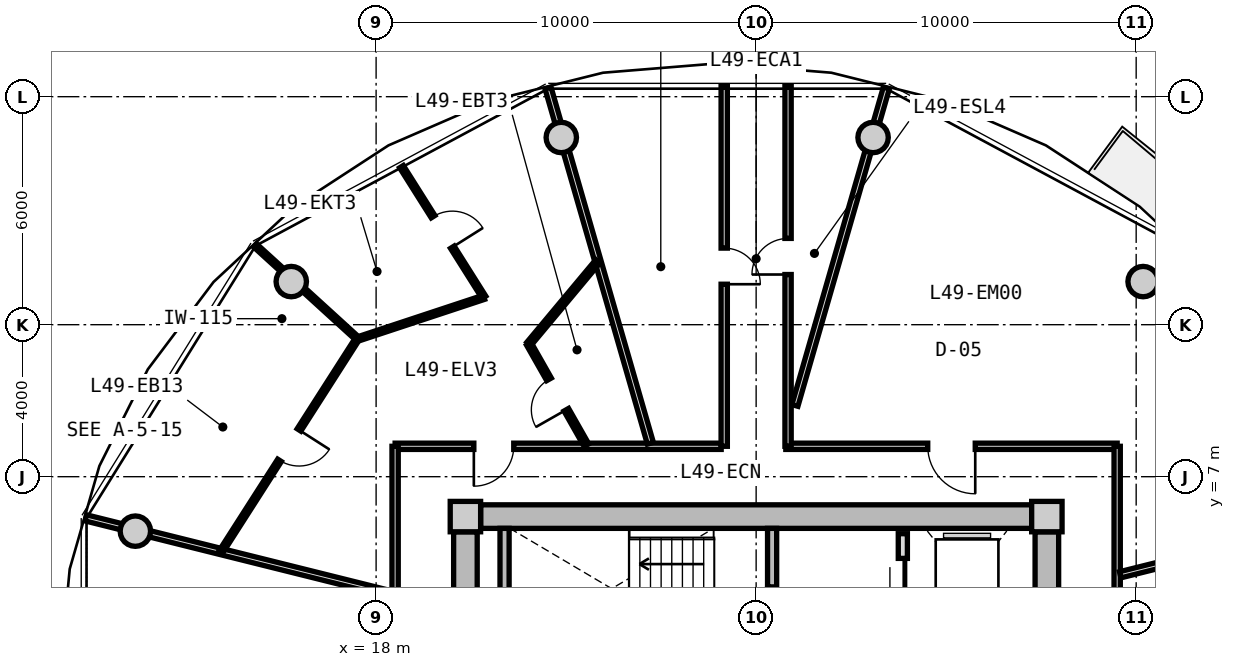
"""IFC4 building model, lengths in metres.
Left out: names, types, materials, properties, quantities, classifications, styles, units other than length and angle.
Written with IfcOpenShell. Run it as: python <this file> out.ifc"""

import sys

from ifc_helpers import new_model, si_unit, direction, frame, frame_2d, origin, origin_2d, place, context, subcontext, project, spatial, rectangle, circle, extrude, source, transform, mapped, element, fill, save


model = new_model("IFC4")
c1 = context("Model", 3, precision=1e-05, world=origin(), true_north=direction((0.0, 1.0)))
c2 = subcontext(c1, "Body", "Model", "MODEL_VIEW")
j1 = project(units=[si_unit("LENGTHUNIT", "METRE"), si_unit("PLANEANGLEUNIT", "RADIAN")], contexts=[c1])
p1 = place(None, origin())
s1 = spatial("IfcSite", under=j1, at=p1, CompositionType="ELEMENT")
p2 = place(p1, origin())
s2 = spatial("IfcBuilding", under=s1, at=p2, CompositionType="ELEMENT")
p3 = place(p2, frame((0.0, 0.0, 158.7)))
s3 = spatial("IfcBuildingStorey", under=s2, at=p3, CompositionType="ELEMENT", Elevation=158.7)
m1 = source(origin(), c2, "Body", "SweptSolid", [
    extrude(rectangle(XDim=0.8, YDim=0.8, at=origin_2d()), origin(), (0.0, 0.0, 1.0), 3.05),
])
for number, where, z_axis, x_axis in (
    (1, (35.65, 5.95, 0.0), (0.0, 0.0, 1.0), (1.0, 0.0, 0.0)),
    (2, (20.35, 5.95, 0.0), (0.0, 0.0, 1.0), (1.0, 0.0, 0.0)),
):
    element("IfcColumn", number, at=place(p3, frame(where, z_axis=z_axis, x_axis=x_axis)), inside=s3, PredefinedType="COLUMN", context=c2, shape_type="MappedRepresentation", body=[
        mapped(m1, transform((0.0, 0.0, 0.0), x_axis=(1.0, 0.0, 0.0), y_axis=(0.0, 1.0, 0.0), z_axis=(0.0, 0.0, 1.0), scale=1.0)),
    ])
m2 = source(origin(), c2, "Body", "SweptSolid", [
    extrude(rectangle(XDim=14.5, YDim=0.62, at=frame_2d((7.25, 0.0))), origin(), (0.0, 0.0, 1.0), 2.81),
])
p4 = place(p3, frame((20.75, 5.95, 0.0), z_axis=(0.0, 0.0, 1.0), x_axis=(1.0, 0.0, 0.0)))
e3 = element("IfcWall", 3, at=p4, inside=s3, PredefinedType="SHEAR", context=c2, shape_type="MappedRepresentation", body=[
    mapped(m2, transform((0.0, 0.0, 0.0), x_axis=(1.0, 0.0, 0.0), y_axis=(0.0, 1.0, 0.0), z_axis=(0.0, 0.0, 1.0), scale=1.0)),
])
m3 = source(origin(), c2, "Body", "SweptSolid", [
    extrude(rectangle(XDim=11.1, YDim=0.62, at=frame_2d((5.55, 0.0))), origin(), (0.0, 0.0, 1.0), 2.81),
])
p5 = place(p3, frame((20.35, -5.55, 0.0), z_axis=(0.0, 0.0, 1.0), x_axis=(0.0, 1.0, 0.0)))
e4 = element("IfcWall", 4, at=p5, inside=s3, PredefinedType="SHEAR", context=c2, shape_type="MappedRepresentation", body=[
    mapped(m3, transform((0.0, 0.0, 0.0), x_axis=(1.0, 0.0, 0.0), y_axis=(0.0, 1.0, 0.0), z_axis=(0.0, 0.0, 1.0), scale=1.0)),
])
p6 = place(p5, frame((3.8, 0.0, 0.0)))
e5 = element("IfcOpeningElement", 5, at=p6, cuts=e4, PredefinedType="OPENING", context=c2, shape_type="SweptSolid", body=[
    extrude(rectangle(XDim=1.2, YDim=2.15, at=frame_2d((0.6, 1.075))), frame((0.0, 0.32, 0.0), z_axis=(0.0, -1.0, 0.0), x_axis=(1.0, 0.0, 0.0)), (0.0, 0.0, 1.0), 0.64),
])
p7 = place(p3, frame((35.65, 5.55, 0.0), z_axis=(0.0, 0.0, 1.0), x_axis=(0.0, -1.0, 0.0)))
e6 = element("IfcWall", 6, at=p7, inside=s3, PredefinedType="SHEAR", context=c2, shape_type="MappedRepresentation", body=[
    mapped(m3, transform((0.0, 0.0, 0.0), x_axis=(1.0, 0.0, 0.0), y_axis=(0.0, 1.0, 0.0), z_axis=(0.0, 0.0, 1.0), scale=1.0)),
])
p8 = place(p7, frame((5.65, 0.0, 0.0)))
e7 = element("IfcOpeningElement", 7, at=p8, cuts=e6, PredefinedType="OPENING", context=c2, shape_type="SweptSolid", body=[
    extrude(rectangle(XDim=1.2, YDim=2.15, at=frame_2d((0.6, 1.075))), frame((0.0, 0.32, 0.0), z_axis=(0.0, -1.0, 0.0), x_axis=(1.0, 0.0, 0.0)), (0.0, 0.0, 1.0), 0.64),
])
m4 = source(origin(), c2, "Body", "SweptSolid", [
    extrude(circle(Radius=0.4, at=origin_2d()), origin(), (0.0, 0.0, 1.0), 3.05),
])
for number, where, z_axis, x_axis in (
    (8, (38.183, 12.135, 0.0), (0.0, 0.0, 1.0), (1.0, 0.0, 0.0)),
    (9, (31.077, 15.926, 0.0), (0.0, 0.0, 1.0), (1.0, 0.0, 0.0)),
    (10, (22.873, 15.926, 0.0), (0.0, 0.0, 1.0), (1.0, 0.0, 0.0)),
    (11, (15.767, 12.135, 0.0), (0.0, 0.0, 1.0), (1.0, 0.0, 0.0)),
    (12, (11.665, 5.567, 0.0), (0.0, 0.0, 1.0), (1.0, 0.0, 0.0)),
):
    element("IfcColumn", number, at=place(p3, frame(where, z_axis=z_axis, x_axis=x_axis)), inside=s3, PredefinedType="COLUMN", context=c2, shape_type="MappedRepresentation", body=[
        mapped(m4, transform((0.0, 0.0, 0.0), x_axis=(1.0, 0.0, 0.0), y_axis=(0.0, 1.0, 0.0), z_axis=(0.0, 0.0, 1.0), scale=1.0)),
    ])
m5 = source(origin(), c2, "Body", "SweptSolid", [
    extrude(rectangle(XDim=3.19, YDim=0.24, at=frame_2d((1.595, 0.0))), origin(), (0.0, 0.0, 1.0), 2.81),
])
p9 = place(p3, frame((21.38, 2.45, 0.0), z_axis=(0.0, 0.0, 1.0), x_axis=(0.0, 1.0, 0.0)))
e13 = element("IfcWall", 13, at=p9, inside=s3, PredefinedType="PARTITIONING", context=c2, shape_type="MappedRepresentation", body=[
    mapped(m5, transform((0.0, 0.0, 0.0), x_axis=(1.0, 0.0, 0.0), y_axis=(0.0, 1.0, 0.0), z_axis=(0.0, 0.0, 1.0), scale=1.0)),
])
p10 = place(p3, frame((28.42, 2.45, 0.0), z_axis=(0.0, 0.0, 1.0), x_axis=(0.0, 1.0, 0.0)))
e14 = element("IfcWall", 14, at=p10, inside=s3, PredefinedType="PARTITIONING", context=c2, shape_type="MappedRepresentation", body=[
    mapped(m5, transform((0.0, 0.0, 0.0), x_axis=(1.0, 0.0, 0.0), y_axis=(0.0, 1.0, 0.0), z_axis=(0.0, 0.0, 1.0), scale=1.0)),
])
p11 = place(p10, frame((0.55, 0.0, 0.0)))
e15 = element("IfcOpeningElement", 15, at=p11, cuts=e14, PredefinedType="OPENING", context=c2, shape_type="SweptSolid", body=[
    extrude(rectangle(XDim=1.1, YDim=2.15, at=frame_2d((0.55, 1.075))), frame((0.0, 0.13, 0.0), z_axis=(0.0, -1.0, 0.0), x_axis=(1.0, 0.0, 0.0)), (0.0, 0.0, 1.0), 0.26),
])
m6 = source(origin(), c2, "Body", "SweptSolid", [
    extrude(rectangle(XDim=5.0, YDim=0.24, at=frame_2d((2.5, 0.0))), origin(), (0.0, 0.0, 1.0), 2.795),
])
p12 = place(p3, frame((31.86, 0.5, 0.0), z_axis=(0.0, 0.0, 1.0), x_axis=(0.0, 1.0, 0.0)))
e16 = element("IfcWall", 16, at=p12, inside=s3, PredefinedType="PARTITIONING", context=c2, shape_type="MappedRepresentation", body=[
    mapped(m6, transform((0.0, 0.0, 0.0), x_axis=(1.0, 0.0, 0.0), y_axis=(0.0, 1.0, 0.0), z_axis=(0.0, 0.0, 1.0), scale=1.0)),
])
p13 = place(p12, frame((3.05, 0.0, 0.0)))
e17 = element("IfcOpeningElement", 17, at=p13, cuts=e16, PredefinedType="OPENING", context=c2, shape_type="SweptSolid", body=[
    extrude(rectangle(XDim=1.3, YDim=2.2, at=frame_2d((0.65, 1.1))), frame((0.0, 0.13, 0.0), z_axis=(0.0, -1.0, 0.0), x_axis=(1.0, 0.0, 0.0)), (0.0, 0.0, 1.0), 0.26),
])
p14 = place(p12, frame((0.55, 0.0, 0.0)))
e18 = element("IfcOpeningElement", 18, at=p14, cuts=e16, PredefinedType="OPENING", context=c2, shape_type="SweptSolid", body=[
    extrude(rectangle(XDim=1.3, YDim=2.2, at=frame_2d((0.65, 1.1))), frame((0.0, 0.13, 0.0), z_axis=(0.0, -1.0, 0.0), x_axis=(1.0, 0.0, 0.0)), (0.0, 0.0, 1.0), 0.26),
])
m7 = source(origin(), c2, "Body", "SweptSolid", [
    extrude(rectangle(XDim=8.58, YDim=0.165, at=frame_2d((4.29, 0.0))), origin(), (0.0, 0.0, 1.0), 2.795),
])
p15 = place(p3, frame((18.5, 7.8, 0.0), z_axis=(0.0, 0.0, 1.0), x_axis=(1.0, 0.0, 0.0)))
e19 = element("IfcWall", 19, at=p15, inside=s3, PredefinedType="PARTITIONING", context=c2, shape_type="MappedRepresentation", body=[
    mapped(m7, transform((0.0, 0.0, 0.0), x_axis=(1.0, 0.0, 0.0), y_axis=(0.0, 1.0, 0.0), z_axis=(0.0, 0.0, 1.0), scale=1.0)),
])
p16 = place(p15, frame((2.072, 0.0, 0.0)))
e20 = element("IfcOpeningElement", 20, at=p16, cuts=e19, PredefinedType="OPENING", context=c2, shape_type="SweptSolid", body=[
    extrude(rectangle(XDim=1.05, YDim=2.15, at=frame_2d((0.525, 1.075))), frame((0.0, 0.093, 0.0), z_axis=(0.0, -1.0, 0.0), x_axis=(1.0, 0.0, 0.0)), (0.0, 0.0, 1.0), 0.185),
])
m8 = source(origin(), c2, "Body", "SweptSolid", [
    extrude(rectangle(XDim=8.719, YDim=0.165, at=frame_2d((4.36, 0.0))), origin(), (0.0, 0.0, 1.0), 2.795),
])
p17 = place(p3, frame((28.781, 7.8, 0.0), z_axis=(0.0, 0.0, 1.0), x_axis=(1.0, 0.0, 0.0)))
e21 = element("IfcWall", 21, at=p17, inside=s3, PredefinedType="PARTITIONING", context=c2, shape_type="MappedRepresentation", body=[
    mapped(m8, transform((0.0, 0.0, 0.0), x_axis=(1.0, 0.0, 0.0), y_axis=(0.0, 1.0, 0.0), z_axis=(0.0, 0.0, 1.0), scale=1.0)),
])
p18 = place(p17, frame((3.735, 0.0, 0.0)))
e22 = element("IfcOpeningElement", 22, at=p18, cuts=e21, PredefinedType="OPENING", context=c2, shape_type="SweptSolid", body=[
    extrude(rectangle(XDim=1.25, YDim=2.2, at=frame_2d((0.625, 1.1))), frame((0.0, 0.093, 0.0), z_axis=(0.0, -1.0, 0.0), x_axis=(1.0, 0.0, 0.0)), (0.0, 0.0, 1.0), 0.185),
])
m9 = source(origin(), c2, "Body", "SweptSolid", [
    extrude(rectangle(XDim=6.88, YDim=0.165, at=frame_2d((3.44, 0.0))), origin(), (0.0, 0.0, 1.0), 2.795),
])
for number, where, z_axis, x_axis in (
    (23, (18.5, 0.92, 0.0), (0.0, 0.0, 1.0), (0.0, 1.0, 0.0)),
    (24, (37.5, 7.8, 0.0), (0.0, 0.0, 1.0), (0.0, -1.0, 0.0)),
):
    element("IfcWall", number, at=place(p3, frame(where, z_axis=z_axis, x_axis=x_axis)), inside=s3, PredefinedType="PARTITIONING", context=c2, shape_type="MappedRepresentation", body=[
        mapped(m9, transform((0.0, 0.0, 0.0), x_axis=(1.0, 0.0, 0.0), y_axis=(0.0, 1.0, 0.0), z_axis=(0.0, 0.0, 1.0), scale=1.0)),
    ])
m10 = source(origin(), c2, "Body", "SweptSolid", [
    extrude(rectangle(XDim=8.695, YDim=0.165, at=frame_2d((4.348, 0.0))), origin(), (0.0, 0.0, 1.0), 2.345),
])
p19 = place(p3, frame((29.02, 8.875, 0.0), z_axis=(0.0, 0.0, 1.0), x_axis=(0.276797231892, 0.960928349263, 0.0)))
e25 = element("IfcWall", 25, at=p19, inside=s3, PredefinedType="PARTITIONING", context=c2, shape_type="MappedRepresentation", body=[
    mapped(m10, transform((0.0, 0.0, 0.0), x_axis=(1.0, 0.0, 0.0), y_axis=(0.0, 1.0, 0.0), z_axis=(0.0, 0.0, 1.0), scale=1.0)),
])
m11 = source(origin(), c2, "Body", "SweptSolid", [
    extrude(rectangle(XDim=9.73, YDim=0.165, at=frame_2d((4.865, 0.0))), origin(), (0.0, 0.0, 1.0), 2.345),
])
p20 = place(p3, frame((25.217, 7.88, 0.0), z_axis=(0.0, 0.0, 1.0), x_axis=(-0.27679492614, 0.960929013436, 0.0)))
e26 = element("IfcWall", 26, at=p20, inside=s3, PredefinedType="PARTITIONING", context=c2, shape_type="MappedRepresentation", body=[
    mapped(m11, transform((0.0, 0.0, 0.0), x_axis=(1.0, 0.0, 0.0), y_axis=(0.0, 1.0, 0.0), z_axis=(0.0, 0.0, 1.0), scale=1.0)),
])
m12 = source(origin(), c2, "Body", "SweptSolid", [
    extrude(rectangle(XDim=8.305, YDim=0.165, at=frame_2d((4.153, 0.0))), origin(), (0.0, 0.0, 1.0), 2.345),
])
p21 = place(p3, frame((18.42, 3.908, 0.0), z_axis=(0.0, 0.0, 1.0), x_axis=(-0.970309994378, 0.241864662175, 0.0)))
e27 = element("IfcWall", 27, at=p21, inside=s3, PredefinedType="PARTITIONING", context=c2, shape_type="MappedRepresentation", body=[
    mapped(m12, transform((0.0, 0.0, 0.0), x_axis=(1.0, 0.0, 0.0), y_axis=(0.0, 1.0, 0.0), z_axis=(0.0, 0.0, 1.0), scale=1.0)),
])
m13 = source(origin(), c2, "Body", "SweptSolid", [
    extrude(rectangle(XDim=6.193, YDim=0.165, at=frame_2d((3.096, 0.0))), origin(), (0.0, 0.0, 1.0), 2.345),
])
p22 = place(p3, frame((37.58, 4.419, 0.0), z_axis=(0.0, 0.0, 1.0), x_axis=(0.970309243466, 0.241867674657, 0.0)))
e28 = element("IfcWall", 28, at=p22, inside=s3, PredefinedType="PARTITIONING", context=c2, shape_type="MappedRepresentation", body=[
    mapped(m13, transform((0.0, 0.0, 0.0), x_axis=(1.0, 0.0, 0.0), y_axis=(0.0, 1.0, 0.0), z_axis=(0.0, 0.0, 1.0), scale=1.0)),
])
m14 = source(origin(), c2, "Body", "SweptSolid", [
    extrude(rectangle(XDim=9.48, YDim=0.165, at=frame_2d((4.74, 0.0))), origin(), (0.0, 0.0, 1.0), 2.795),
])
p23 = place(p3, frame((27.16, 7.8, 0.0), z_axis=(0.0, 0.0, 1.0), x_axis=(0.0, 1.0, 0.0)))
e29 = element("IfcWall", 29, at=p23, inside=s3, PredefinedType="PARTITIONING", context=c2, shape_type="MappedRepresentation", body=[
    mapped(m14, transform((0.0, 0.0, 0.0), x_axis=(1.0, 0.0, 0.0), y_axis=(0.0, 1.0, 0.0), z_axis=(0.0, 0.0, 1.0), scale=1.0)),
])
p24 = place(p23, frame((4.265, 0.0, 0.0)))
e30 = element("IfcOpeningElement", 30, at=p24, cuts=e29, PredefinedType="OPENING", context=c2, shape_type="SweptSolid", body=[
    extrude(rectangle(XDim=0.95, YDim=2.1, at=frame_2d((0.475, 1.05))), frame((0.0, 0.093, 0.0), z_axis=(0.0, -1.0, 0.0), x_axis=(1.0, 0.0, 0.0)), (0.0, 0.0, 1.0), 0.185),
])
p25 = place(p3, frame((28.84, 17.28, 0.0), z_axis=(0.0, 0.0, 1.0), x_axis=(0.0, -1.0, 0.0)))
e31 = element("IfcWall", 31, at=p25, inside=s3, PredefinedType="PARTITIONING", context=c2, shape_type="MappedRepresentation", body=[
    mapped(m14, transform((0.0, 0.0, 0.0), x_axis=(1.0, 0.0, 0.0), y_axis=(0.0, 1.0, 0.0), z_axis=(0.0, 0.0, 1.0), scale=1.0)),
])
p26 = place(p25, frame((4.01, 0.0, 0.0)))
e32 = element("IfcOpeningElement", 32, at=p26, cuts=e31, PredefinedType="OPENING", context=c2, shape_type="SweptSolid", body=[
    extrude(rectangle(XDim=0.95, YDim=2.1, at=frame_2d((0.475, 1.05))), frame((0.0, 0.093, 0.0), z_axis=(0.0, -1.0, 0.0), x_axis=(1.0, 0.0, 0.0)), (0.0, 0.0, 1.0), 0.185),
])
m15 = source(origin(), c2, "Body", "SweptSolid", [
    extrude(rectangle(XDim=6.654, YDim=0.115, at=frame_2d((3.327, 0.0))), origin(), (0.0, 0.0, 1.0), 2.795),
])
p27 = place(p3, frame((17.509, 10.632, 0.0), z_axis=(0.0, 0.0, 1.0), x_axis=(-0.53923796816, -0.842153438332, 0.0)))
e33 = element("IfcWall", 33, at=p27, inside=s3, PredefinedType="PARTITIONING", context=c2, shape_type="MappedRepresentation", body=[
    mapped(m15, transform((0.0, 0.0, 0.0), x_axis=(1.0, 0.0, 0.0), y_axis=(0.0, 1.0, 0.0), z_axis=(0.0, 0.0, 1.0), scale=1.0)),
])
p28 = place(p27, frame((2.852, 0.0, 0.0)))
e34 = element("IfcOpeningElement", 34, at=p28, cuts=e33, PredefinedType="OPENING", context=c2, shape_type="SweptSolid", body=[
    extrude(rectangle(XDim=0.95, YDim=2.1, at=frame_2d((0.475, 1.05))), frame((0.0, 0.067, 0.0), z_axis=(0.0, -1.0, 0.0), x_axis=(1.0, 0.0, 0.0)), (0.0, 0.0, 1.0), 0.135),
])
m16 = source(origin(), c2, "Body", "SweptSolid", [
    extrude(rectangle(XDim=3.648, YDim=0.115, at=frame_2d((1.824, 0.0))), origin(), (0.0, 0.0, 1.0), 2.345),
])
p29 = place(p3, frame((17.509, 10.632, 0.0), z_axis=(0.0, 0.0, 1.0), x_axis=(-0.739109697605, 0.67358507622, 0.0)))
e35 = element("IfcWall", 35, at=p29, inside=s3, PredefinedType="PARTITIONING", context=c2, shape_type="MappedRepresentation", body=[
    mapped(m16, transform((0.0, 0.0, 0.0), x_axis=(1.0, 0.0, 0.0), y_axis=(0.0, 1.0, 0.0), z_axis=(0.0, 0.0, 1.0), scale=1.0)),
])
m17 = source(origin(), c2, "Body", "SweptSolid", [
    extrude(rectangle(XDim=3.064, YDim=0.14, at=frame_2d((1.532, 0.0))), origin(), (0.0, 0.0, 1.0), 2.795),
])
p30 = place(p3, frame((23.534, 7.83, 0.0), z_axis=(0.0, 0.0, 1.0), x_axis=(-0.494103864861, 0.869402881712, 0.0)))
e36 = element("IfcWall", 36, at=p30, inside=s3, PredefinedType="PARTITIONING", context=c2, shape_type="MappedRepresentation", body=[
    mapped(m17, transform((0.0, 0.0, 0.0), x_axis=(1.0, 0.0, 0.0), y_axis=(0.0, 1.0, 0.0), z_axis=(0.0, 0.0, 1.0), scale=1.0)),
])
p31 = place(p30, frame((1.072, 0.0, 0.0)))
e37 = element("IfcOpeningElement", 37, at=p31, cuts=e36, PredefinedType="OPENING", context=c2, shape_type="SweptSolid", body=[
    extrude(rectangle(XDim=0.92, YDim=2.1, at=frame_2d((0.46, 1.05))), frame((0.0, 0.08, 0.0), z_axis=(0.0, -1.0, 0.0), x_axis=(1.0, 0.0, 0.0)), (0.0, 0.0, 1.0), 0.16),
])
m18 = source(origin(), c2, "Body", "SweptSolid", [
    extrude(rectangle(XDim=2.833, YDim=0.14, at=frame_2d((1.417, 0.0))), origin(), (0.0, 0.0, 1.0), 2.795),
])
p32 = place(p3, frame((22.02, 10.494, 0.0), z_axis=(0.0, 0.0, 1.0), x_axis=(0.64098072766, 0.767556972979, 0.0)))
e38 = element("IfcWall", 38, at=p32, inside=s3, PredefinedType="PARTITIONING", context=c2, shape_type="MappedRepresentation", body=[
    mapped(m18, transform((0.0, 0.0, 0.0), x_axis=(1.0, 0.0, 0.0), y_axis=(0.0, 1.0, 0.0), z_axis=(0.0, 0.0, 1.0), scale=1.0)),
])
m19 = source(origin(), c2, "Body", "SweptSolid", [
    extrude(rectangle(XDim=4.066, YDim=0.115, at=frame_2d((2.033, 0.0))), origin(), (0.0, 0.0, 1.0), 2.795),
])
p33 = place(p3, frame((20.838, 11.721, 0.0), z_axis=(0.0, 0.0, 1.0), x_axis=(-0.533669868169, 0.8456928945, 0.0)))
e39 = element("IfcWall", 39, at=p33, inside=s3, PredefinedType="PARTITIONING", context=c2, shape_type="MappedRepresentation", body=[
    mapped(m19, transform((0.0, 0.0, 0.0), x_axis=(1.0, 0.0, 0.0), y_axis=(0.0, 1.0, 0.0), z_axis=(0.0, 0.0, 1.0), scale=1.0)),
])
p34 = place(p33, frame((1.558, 0.0, 0.0)))
e40 = element("IfcOpeningElement", 40, at=p34, cuts=e39, PredefinedType="OPENING", context=c2, shape_type="SweptSolid", body=[
    extrude(rectangle(XDim=0.95, YDim=2.1, at=frame_2d((0.475, 1.05))), frame((0.0, 0.067, 0.0), z_axis=(0.0, -1.0, 0.0), x_axis=(1.0, 0.0, 0.0)), (0.0, 0.0, 1.0), 0.135),
])
m20 = source(origin(), c2, "Body", "SweptSolid", [
    extrude(rectangle(XDim=3.496, YDim=0.115, at=frame_2d((1.748, 0.0))), origin(), (0.0, 0.0, 1.0), 2.795),
])
p35 = place(p3, frame((20.838, 11.721, 0.0), z_axis=(0.0, 0.0, 1.0), x_axis=(-0.949420852529, -0.314006440672, 0.0)))
e41 = element("IfcWall", 41, at=p35, inside=s3, PredefinedType="PARTITIONING", context=c2, shape_type="MappedRepresentation", body=[
    mapped(m20, transform((0.0, 0.0, 0.0), x_axis=(1.0, 0.0, 0.0), y_axis=(0.0, 1.0, 0.0), z_axis=(0.0, 0.0, 1.0), scale=1.0)),
])
m21 = source(origin(), c2, "Body", "SweptSolid", [
    extrude(rectangle(XDim=1.3, YDim=2.2, at=frame_2d((0.65, 1.1))), frame((0.0, 0.025, 0.0), z_axis=(0.0, -1.0, 0.0), x_axis=(1.0, 0.0, 0.0)), (0.0, 0.0, 1.0), 0.05),
])
p36 = place(p13, origin())
e42 = element("IfcDoor", 42, at=p36, inside=s3, OperationType="SLIDING_TO_LEFT", PredefinedType="DOOR", context=c2, shape_type="MappedRepresentation", body=[
    mapped(m21, transform((0.0, 0.0, 0.0), x_axis=(1.0, 0.0, 0.0), y_axis=(0.0, 1.0, 0.0), z_axis=(0.0, 0.0, 1.0), scale=1.0)),
])
fill(e17, e42)
m22 = source(origin(), c2, "Body", "SweptSolid", [
    extrude(rectangle(XDim=0.95, YDim=2.1, at=frame_2d((0.475, 1.05))), frame((0.0, 0.025, 0.0), z_axis=(0.0, -1.0, 0.0), x_axis=(1.0, 0.0, 0.0)), (0.0, 0.0, 1.0), 0.05),
])
p37 = place(p24, frame((0.95, 0.0, 0.0), z_axis=(0.0, 0.0, 1.0), x_axis=(-1.0, 0.0, 0.0)))
e43 = element("IfcDoor", 43, at=p37, inside=s3, OperationType="SINGLE_SWING_RIGHT", PredefinedType="DOOR", context=c2, shape_type="MappedRepresentation", body=[
    mapped(m22, transform((0.0, 0.0, 0.0), x_axis=(1.0, 0.0, 0.0), y_axis=(0.0, 1.0, 0.0), z_axis=(0.0, 0.0, 1.0), scale=1.0)),
])
fill(e30, e43)
p38 = place(p26, frame((0.95, 0.0, 0.0), z_axis=(0.0, 0.0, 1.0), x_axis=(-1.0, 0.0, 0.0)))
e44 = element("IfcDoor", 44, at=p38, inside=s3, OperationType="SINGLE_SWING_LEFT", PredefinedType="DOOR", context=c2, shape_type="MappedRepresentation", body=[
    mapped(m22, transform((0.0, 0.0, 0.0), x_axis=(1.0, 0.0, 0.0), y_axis=(0.0, 1.0, 0.0), z_axis=(0.0, 0.0, 1.0), scale=1.0)),
])
fill(e32, e44)
m23 = source(origin(), c2, "Body", "SweptSolid", [
    extrude(rectangle(XDim=1.25, YDim=2.2, at=frame_2d((0.625, 1.1))), frame((0.0, 0.025, 0.0), z_axis=(0.0, -1.0, 0.0), x_axis=(1.0, 0.0, 0.0)), (0.0, 0.0, 1.0), 0.05),
])
p39 = place(p18, frame((1.25, 0.0, 0.0), z_axis=(0.0, 0.0, 1.0), x_axis=(-1.0, 0.0, 0.0)))
e45 = element("IfcDoor", 45, at=p39, inside=s3, OperationType="SINGLE_SWING_LEFT", PredefinedType="DOOR", context=c2, shape_type="MappedRepresentation", body=[
    mapped(m23, transform((0.0, 0.0, 0.0), x_axis=(1.0, 0.0, 0.0), y_axis=(0.0, 1.0, 0.0), z_axis=(0.0, 0.0, 1.0), scale=1.0)),
])
fill(e22, e45)
m24 = source(origin(), c2, "Body", "SweptSolid", [
    extrude(rectangle(XDim=1.05, YDim=2.15, at=frame_2d((0.525, 1.075))), frame((0.0, 0.025, 0.0), z_axis=(0.0, -1.0, 0.0), x_axis=(1.0, 0.0, 0.0)), (0.0, 0.0, 1.0), 0.05),
])
p40 = place(p16, frame((1.05, 0.0, 0.0), z_axis=(0.0, 0.0, 1.0), x_axis=(-1.0, 0.0, 0.0)))
e46 = element("IfcDoor", 46, at=p40, inside=s3, OperationType="SINGLE_SWING_RIGHT", PredefinedType="DOOR", context=c2, shape_type="MappedRepresentation", body=[
    mapped(m24, transform((0.0, 0.0, 0.0), x_axis=(1.0, 0.0, 0.0), y_axis=(0.0, 1.0, 0.0), z_axis=(0.0, 0.0, 1.0), scale=1.0)),
])
fill(e20, e46)
m25 = source(origin(), c2, "Body", "SweptSolid", [
    extrude(rectangle(XDim=0.92, YDim=2.1, at=frame_2d((0.46, 1.05))), frame((0.0, 0.025, 0.0), z_axis=(0.0, -1.0, 0.0), x_axis=(1.0, 0.0, 0.0)), (0.0, 0.0, 1.0), 0.05),
])
p41 = place(p31, origin())
e47 = element("IfcDoor", 47, at=p41, inside=s3, OperationType="SINGLE_SWING_LEFT", PredefinedType="DOOR", context=c2, shape_type="MappedRepresentation", body=[
    mapped(m25, transform((0.0, 0.0, 0.0), x_axis=(1.0, 0.0, 0.0), y_axis=(0.0, 1.0, 0.0), z_axis=(0.0, 0.0, 1.0), scale=1.0)),
])
fill(e37, e47)
p42 = place(p34, frame((0.95, 0.0, 0.0), z_axis=(0.0, 0.0, 1.0), x_axis=(-1.0, 0.0, 0.0)))
e48 = element("IfcDoor", 48, at=p42, inside=s3, OperationType="SINGLE_SWING_RIGHT", PredefinedType="DOOR", context=c2, shape_type="MappedRepresentation", body=[
    mapped(m22, transform((0.0, 0.0, 0.0), x_axis=(1.0, 0.0, 0.0), y_axis=(0.0, 1.0, 0.0), z_axis=(0.0, 0.0, 1.0), scale=1.0)),
])
fill(e40, e48)
p43 = place(p28, origin())
e49 = element("IfcDoor", 49, at=p43, inside=s3, OperationType="SINGLE_SWING_LEFT", PredefinedType="DOOR", context=c2, shape_type="MappedRepresentation", body=[
    mapped(m22, transform((0.0, 0.0, 0.0), x_axis=(1.0, 0.0, 0.0), y_axis=(0.0, 1.0, 0.0), z_axis=(0.0, 0.0, 1.0), scale=1.0)),
])
fill(e34, e49)
save(model, sys.argv[1])
